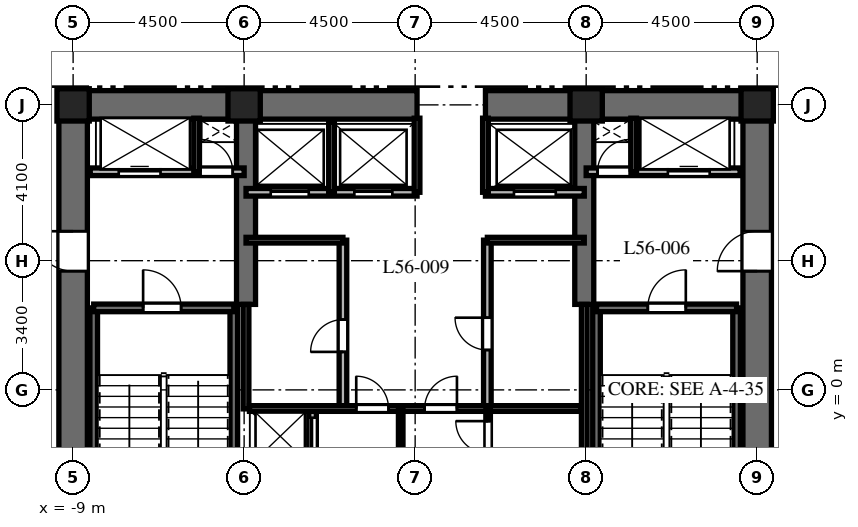
"""IFC4 building model, lengths in metres.
Left out: names, types, materials, properties, quantities, classifications, styles, units other than length and angle.
Written with IfcOpenShell. Run it as: python <this file> out.ifc"""

import sys

from ifc_helpers import new_model, si_unit, direction, frame, frame_2d, origin, origin_2d, place, context, subcontext, project, spatial, rectangle, extrude, element, fill, save


model = new_model("IFC4")
c1 = context("Model", 3, precision=1e-05, world=origin(), true_north=direction((0.0, 1.0)))
c2 = subcontext(c1, "Body", "Model", "MODEL_VIEW")
j1 = project(units=[si_unit("LENGTHUNIT", "METRE"), si_unit("PLANEANGLEUNIT", "RADIAN")], contexts=[c1])
p1 = place(None, origin())
s1 = spatial("IfcSite", under=j1, at=p1, CompositionType="ELEMENT")
p2 = place(p1, origin())
s2 = spatial("IfcBuilding", under=s1, at=p2, CompositionType="ELEMENT")
p3 = place(p2, frame((0.0, 0.0, 225.5)))
s3 = spatial("IfcBuildingStorey", under=s2, at=p3, CompositionType="ELEMENT", Elevation=225.5)
p4 = place(p3, frame((-9.375, 7.5, 0.0), z_axis=(0.0, 0.0, 1.0), x_axis=(1.0, 0.0, 0.0)))
e1 = element("IfcWall", 1, at=p4, inside=s3, PredefinedType="SHEAR", context=c2, shape_type="SweptSolid", body=[
    extrude(rectangle(XDim=9.425, YDim=0.75, at=frame_2d((4.712, 0.0))), origin(), (0.0, 0.0, 1.0), 3.8),
])
p5 = place(p3, frame((1.85, 7.5, 0.0), z_axis=(0.0, 0.0, 1.0), x_axis=(1.0, 0.0, 0.0)))
e2 = element("IfcWall", 2, at=p5, inside=s3, PredefinedType="SHEAR", context=c2, shape_type="SweptSolid", body=[
    extrude(rectangle(XDim=7.525, YDim=0.75, at=frame_2d((3.762, 0.0))), origin(), (0.0, 0.0, 1.0), 3.8),
])
p6 = place(p3, frame((-9.0, -7.125, 0.0), z_axis=(0.0, 0.0, 1.0), x_axis=(0.0, 1.0, 0.0)))
e3 = element("IfcWall", 3, at=p6, inside=s3, PredefinedType="SHEAR", context=c2, shape_type="SweptSolid", body=[
    extrude(rectangle(XDim=14.25, YDim=0.75, at=frame_2d((7.125, 0.0))), origin(), (0.0, 0.0, 1.0), 3.8),
])
p7 = place(p6, frame((10.25, 0.0, 0.0)))
e4 = element("IfcOpeningElement", 4, at=p7, cuts=e3, PredefinedType="OPENING", context=c2, shape_type="SweptSolid", body=[
    extrude(rectangle(XDim=1.05, YDim=2.15, at=frame_2d((0.525, 1.075))), frame((0.0, 0.385, 0.0), z_axis=(0.0, -1.0, 0.0), x_axis=(1.0, 0.0, 0.0)), (0.0, 0.0, 1.0), 0.77),
])
p8 = place(p3, frame((9.0, -7.125, 0.0), z_axis=(0.0, 0.0, 1.0), x_axis=(0.0, 1.0, 0.0)))
e5 = element("IfcWall", 5, at=p8, inside=s3, PredefinedType="SHEAR", context=c2, shape_type="SweptSolid", body=[
    extrude(rectangle(XDim=14.25, YDim=0.75, at=frame_2d((7.125, 0.0))), origin(), (0.0, 0.0, 1.0), 3.8),
])
p9 = place(p8, frame((10.25, 0.0, 0.0)))
e6 = element("IfcOpeningElement", 6, at=p9, cuts=e5, PredefinedType="OPENING", context=c2, shape_type="SweptSolid", body=[
    extrude(rectangle(XDim=1.05, YDim=2.15, at=frame_2d((0.525, 1.075))), frame((0.0, 0.385, 0.0), z_axis=(0.0, -1.0, 0.0), x_axis=(1.0, 0.0, 0.0)), (0.0, 0.0, 1.0), 0.77),
])
for number, where, z_axis, x_axis in (
    (7, (-4.45, 2.25, 0.0), (0.0, 0.0, 1.0), (0.0, 1.0, 0.0)),
    (8, (4.45, 2.25, 0.0), (0.0, 0.0, 1.0), (0.0, 1.0, 0.0)),
):
    element("IfcWall", number, at=place(p3, frame(where, z_axis=z_axis, x_axis=x_axis)), inside=s3, PredefinedType="SHEAR", context=c2, shape_type="SweptSolid", body=[
        extrude(rectangle(XDim=4.875, YDim=0.5, at=frame_2d((2.438, 0.0))), origin(), (0.0, 0.0, 1.0), 3.8),
    ])
for number, where, z_axis, x_axis in (
    (9, (-8.458, -6.985, 0.0), (0.0, 0.0, 1.0), (0.0, 1.0, 0.0)),
    (10, (-4.772, -6.985, 0.0), (0.0, 0.0, 1.0), (0.0, 1.0, 0.0)),
):
    element("IfcWall", number, at=place(p3, frame(where, z_axis=z_axis, x_axis=x_axis)), inside=s3, PredefinedType="SHEAR", context=c2, shape_type="SweptSolid", body=[
        extrude(rectangle(XDim=9.143, YDim=0.2, at=frame_2d((4.572, 0.0))), origin(), (0.0, 0.0, 1.0), 3.8),
    ])
p10 = place(p3, frame((-8.458, 2.158, 0.0), z_axis=(0.0, 0.0, 1.0), x_axis=(1.0, 0.0, 0.0)))
e11 = element("IfcWall", 11, at=p10, inside=s3, PredefinedType="SHEAR", context=c2, shape_type="SweptSolid", body=[
    extrude(rectangle(XDim=3.686, YDim=0.2, at=frame_2d((1.843, 0.0))), origin(), (0.0, 0.0, 1.0), 3.8),
])
p11 = place(p10, frame((1.3, 0.0, 0.0)))
e12 = element("IfcOpeningElement", 12, at=p11, cuts=e11, PredefinedType="OPENING", context=c2, shape_type="SweptSolid", body=[
    extrude(rectangle(XDim=1.0, YDim=2.15, at=frame_2d((0.5, 1.075))), frame((0.0, 0.11, 0.0), z_axis=(0.0, -1.0, 0.0), x_axis=(1.0, 0.0, 0.0)), (0.0, 0.0, 1.0), 0.22),
])
for number, where, z_axis, x_axis in (
    (13, (4.772, -6.985, 0.0), (0.0, 0.0, 1.0), (0.0, 1.0, 0.0)),
    (14, (8.458, -6.985, 0.0), (0.0, 0.0, 1.0), (0.0, 1.0, 0.0)),
):
    element("IfcWall", number, at=place(p3, frame(where, z_axis=z_axis, x_axis=x_axis)), inside=s3, PredefinedType="SHEAR", context=c2, shape_type="SweptSolid", body=[
        extrude(rectangle(XDim=9.143, YDim=0.2, at=frame_2d((4.572, 0.0))), origin(), (0.0, 0.0, 1.0), 3.8),
    ])
p12 = place(p3, frame((4.772, 2.158, 0.0), z_axis=(0.0, 0.0, 1.0), x_axis=(1.0, 0.0, 0.0)))
e15 = element("IfcWall", 15, at=p12, inside=s3, PredefinedType="SHEAR", context=c2, shape_type="SweptSolid", body=[
    extrude(rectangle(XDim=3.686, YDim=0.2, at=frame_2d((1.843, 0.0))), origin(), (0.0, 0.0, 1.0), 3.8),
])
p13 = place(p12, frame((1.35, 0.0, 0.0)))
e16 = element("IfcOpeningElement", 16, at=p13, cuts=e15, PredefinedType="OPENING", context=c2, shape_type="SweptSolid", body=[
    extrude(rectangle(XDim=1.0, YDim=2.15, at=frame_2d((0.5, 1.075))), frame((0.0, 0.11, 0.0), z_axis=(0.0, -1.0, 0.0), x_axis=(1.0, 0.0, 0.0)), (0.0, 0.0, 1.0), 0.22),
])
for number, where, z_axis, x_axis in (
    (17, (9.0, 7.5, 0.0), (0.0, 0.0, 1.0), (1.0, 0.0, 0.0)),
    (18, (4.5, 7.5, 0.0), (0.0, 0.0, 1.0), (1.0, 0.0, 0.0)),
    (19, (-4.5, 7.5, 0.0), (0.0, 0.0, 1.0), (1.0, 0.0, 0.0)),
    (20, (-9.0, 7.5, 0.0), (0.0, 0.0, 1.0), (1.0, 0.0, 0.0)),
):
    element("IfcColumn", number, at=place(p3, frame(where, z_axis=z_axis, x_axis=x_axis)), inside=s3, PredefinedType="COLUMN", context=c2, shape_type="SweptSolid", body=[
        extrude(rectangle(XDim=0.85, YDim=0.85, at=origin_2d()), origin(), (0.0, 0.0, 1.0), 3.8),
    ])
p14 = place(p3, frame((-8.55, 5.74, 0.0), z_axis=(0.0, 0.0, 1.0), x_axis=(1.0, 0.0, 0.0)))
e21 = element("IfcWall", 21, at=p14, inside=s3, PredefinedType="PARTITIONING", context=c2, shape_type="SweptSolid", body=[
    extrude(rectangle(XDim=4.05, YDim=0.2, at=frame_2d((2.025, 0.0))), origin(), (0.0, 0.0, 1.0), 3.5),
])
p15 = place(p14, frame((0.75, 0.0, 0.0)))
e22 = element("IfcOpeningElement", 22, at=p15, cuts=e21, PredefinedType="OPENING", context=c2, shape_type="SweptSolid", body=[
    extrude(rectangle(XDim=1.1, YDim=2.2, at=frame_2d((0.55, 1.1))), frame((0.0, 0.11, 0.0), z_axis=(0.0, -1.0, 0.0), x_axis=(1.0, 0.0, 0.0)), (0.0, 0.0, 1.0), 0.22),
])
p16 = place(p14, frame((2.9, 0.0, 0.0)))
e23 = element("IfcOpeningElement", 23, at=p16, cuts=e21, PredefinedType="OPENING", context=c2, shape_type="SweptSolid", body=[
    extrude(rectangle(XDim=0.85, YDim=2.03, at=frame_2d((0.425, 1.015))), frame((0.0, 0.11, 0.0), z_axis=(0.0, -1.0, 0.0), x_axis=(1.0, 0.0, 0.0)), (0.0, 0.0, 1.0), 0.22),
])
p17 = place(p3, frame((-5.75, 5.74, 0.0), z_axis=(0.0, 0.0, 1.0), x_axis=(0.0, 1.0, 0.0)))
e24 = element("IfcWall", 24, at=p17, inside=s3, PredefinedType="PARTITIONING", context=c2, shape_type="SweptSolid", body=[
    extrude(rectangle(XDim=1.41, YDim=0.15, at=frame_2d((0.705, 0.0))), origin(), (0.0, 0.0, 1.0), 3.5),
])
p18 = place(p3, frame((4.5, 5.74, 0.0), z_axis=(0.0, 0.0, 1.0), x_axis=(1.0, 0.0, 0.0)))
e25 = element("IfcWall", 25, at=p18, inside=s3, PredefinedType="PARTITIONING", context=c2, shape_type="SweptSolid", body=[
    extrude(rectangle(XDim=4.05, YDim=0.2, at=frame_2d((2.025, 0.0))), origin(), (0.0, 0.0, 1.0), 3.5),
])
p19 = place(p18, frame((0.3, 0.0, 0.0)))
e26 = element("IfcOpeningElement", 26, at=p19, cuts=e25, PredefinedType="OPENING", context=c2, shape_type="SweptSolid", body=[
    extrude(rectangle(XDim=0.85, YDim=2.03, at=frame_2d((0.425, 1.015))), frame((0.0, 0.11, 0.0), z_axis=(0.0, -1.0, 0.0), x_axis=(1.0, 0.0, 0.0)), (0.0, 0.0, 1.0), 0.22),
])
p20 = place(p18, frame((2.15, 0.0, 0.0)))
e27 = element("IfcOpeningElement", 27, at=p20, cuts=e25, PredefinedType="OPENING", context=c2, shape_type="SweptSolid", body=[
    extrude(rectangle(XDim=1.1, YDim=2.2, at=frame_2d((0.55, 1.1))), frame((0.0, 0.11, 0.0), z_axis=(0.0, -1.0, 0.0), x_axis=(1.0, 0.0, 0.0)), (0.0, 0.0, 1.0), 0.22),
])
p21 = place(p3, frame((5.75, 5.74, 0.0), z_axis=(0.0, 0.0, 1.0), x_axis=(0.0, 1.0, 0.0)))
e28 = element("IfcWall", 28, at=p21, inside=s3, PredefinedType="PARTITIONING", context=c2, shape_type="SweptSolid", body=[
    extrude(rectangle(XDim=1.41, YDim=0.15, at=frame_2d((0.705, 0.0))), origin(), (0.0, 0.0, 1.0), 3.5),
])
p22 = place(p3, frame((-2.7, -1.972, 0.0), z_axis=(0.0, 0.0, 1.0), x_axis=(0.0, 1.0, 0.0)))
e29 = element("IfcWall", 29, at=p22, inside=s3, PredefinedType="PARTITIONING", context=c2, shape_type="SweptSolid", body=[
    extrude(rectangle(XDim=1.472, YDim=0.2, at=frame_2d((0.736, 0.0))), origin(), (0.0, 0.0, 1.0), 3.5),
])
p23 = place(p22, frame((0.24, 0.0, 0.0)))
e30 = element("IfcOpeningElement", 30, at=p23, cuts=e29, PredefinedType="OPENING", context=c2, shape_type="SweptSolid", body=[
    extrude(rectangle(XDim=1.0, YDim=2.2, at=frame_2d((0.5, 1.1))), frame((0.0, 0.11, 0.0), z_axis=(0.0, -1.0, 0.0), x_axis=(1.0, 0.0, 0.0)), (0.0, 0.0, 1.0), 0.22),
])
p24 = place(p3, frame((-4.45, 5.2, 0.0), z_axis=(0.0, 0.0, 1.0), x_axis=(1.0, 0.0, 0.0)))
e31 = element("IfcWall", 31, at=p24, inside=s3, PredefinedType="PARTITIONING", context=c2, shape_type="SweptSolid", body=[
    extrude(rectangle(XDim=4.5, YDim=0.2, at=frame_2d((2.25, 0.0))), origin(), (0.0, 0.0, 1.0), 3.5),
])
p25 = place(p24, frame((0.65, 0.0, 0.0)))
e32 = element("IfcOpeningElement", 32, at=p25, cuts=e31, PredefinedType="OPENING", context=c2, shape_type="SweptSolid", body=[
    extrude(rectangle(XDim=1.0, YDim=2.2, at=frame_2d((0.5, 1.1))), frame((0.0, 0.11, 0.0), z_axis=(0.0, -1.0, 0.0), x_axis=(1.0, 0.0, 0.0)), (0.0, 0.0, 1.0), 0.22),
])
p26 = place(p24, frame((2.85, 0.0, 0.0)))
e33 = element("IfcOpeningElement", 33, at=p26, cuts=e31, PredefinedType="OPENING", context=c2, shape_type="SweptSolid", body=[
    extrude(rectangle(XDim=1.0, YDim=2.2, at=frame_2d((0.5, 1.1))), frame((0.0, 0.11, 0.0), z_axis=(0.0, -1.0, 0.0), x_axis=(1.0, 0.0, 0.0)), (0.0, 0.0, 1.0), 0.22),
])
p27 = place(p3, frame((1.85, 5.2, 0.0), z_axis=(0.0, 0.0, 1.0), x_axis=(1.0, 0.0, 0.0)))
e34 = element("IfcWall", 34, at=p27, inside=s3, PredefinedType="PARTITIONING", context=c2, shape_type="SweptSolid", body=[
    extrude(rectangle(XDim=2.6, YDim=0.2, at=frame_2d((1.3, 0.0))), origin(), (0.0, 0.0, 1.0), 3.5),
])
p28 = place(p27, frame((0.75, 0.0, 0.0)))
e35 = element("IfcOpeningElement", 35, at=p28, cuts=e34, PredefinedType="OPENING", context=c2, shape_type="SweptSolid", body=[
    extrude(rectangle(XDim=1.1, YDim=2.2, at=frame_2d((0.55, 1.1))), frame((0.0, 0.11, 0.0), z_axis=(0.0, -1.0, 0.0), x_axis=(1.0, 0.0, 0.0)), (0.0, 0.0, 1.0), 0.22),
])
p29 = place(p3, frame((-2.2, 5.2, 0.0), z_axis=(0.0, 0.0, 1.0), x_axis=(0.0, 1.0, 0.0)))
e36 = element("IfcWall", 36, at=p29, inside=s3, PredefinedType="PARTITIONING", context=c2, shape_type="SweptSolid", body=[
    extrude(rectangle(XDim=1.85, YDim=0.15, at=frame_2d((0.925, 0.0))), origin(), (0.0, 0.0, 1.0), 3.5),
])
for number, where, z_axis, x_axis in (
    (37, (0.05, 5.2, 0.0), (0.0, 0.0, 1.0), (0.0, 1.0, 0.0)),
    (38, (1.85, 5.2, 0.0), (0.0, 0.0, 1.0), (0.0, 1.0, 0.0)),
):
    element("IfcWall", number, at=place(p3, frame(where, z_axis=z_axis, x_axis=x_axis)), inside=s3, PredefinedType="PARTITIONING", context=c2, shape_type="SweptSolid", body=[
        extrude(rectangle(XDim=1.95, YDim=0.15, at=frame_2d((0.975, 0.0))), origin(), (0.0, 0.0, 1.0), 3.5),
    ])
p30 = place(p3, frame((-4.45, -0.5, 0.0), z_axis=(0.0, 0.0, 1.0), x_axis=(0.0, 1.0, 0.0)))
e39 = element("IfcWall", 39, at=p30, inside=s3, PredefinedType="PARTITIONING", context=c2, shape_type="SweptSolid", body=[
    extrude(rectangle(XDim=2.75, YDim=0.15, at=frame_2d((1.375, 0.0))), origin(), (0.0, 0.0, 1.0), 3.5),
])
p31 = place(p3, frame((4.45, -1.972, 0.0), z_axis=(0.0, 0.0, 1.0), x_axis=(0.0, 1.0, 0.0)))
e40 = element("IfcWall", 40, at=p31, inside=s3, PredefinedType="PARTITIONING", context=c2, shape_type="SweptSolid", body=[
    extrude(rectangle(XDim=4.222, YDim=0.15, at=frame_2d((2.111, 0.0))), origin(), (0.0, 0.0, 1.0), 3.5),
])
p32 = place(p3, frame((-1.9, -0.5, 0.0), z_axis=(0.0, 0.0, 1.0), x_axis=(0.0, 1.0, 0.0)))
e41 = element("IfcWall", 41, at=p32, inside=s3, PredefinedType="PARTITIONING", context=c2, shape_type="SweptSolid", body=[
    extrude(rectangle(XDim=4.44, YDim=0.2, at=frame_2d((2.22, 0.0))), origin(), (0.0, 0.0, 1.0), 3.5),
])
p33 = place(p32, frame((1.5, 0.0, 0.0)))
e42 = element("IfcOpeningElement", 42, at=p33, cuts=e41, PredefinedType="OPENING", context=c2, shape_type="SweptSolid", body=[
    extrude(rectangle(XDim=0.85, YDim=2.03, at=frame_2d((0.425, 1.015))), frame((0.0, 0.11, 0.0), z_axis=(0.0, -1.0, 0.0), x_axis=(1.0, 0.0, 0.0)), (0.0, 0.0, 1.0), 0.22),
])
p34 = place(p3, frame((-4.45, 3.94, 0.0), z_axis=(0.0, 0.0, 1.0), x_axis=(1.0, 0.0, 0.0)))
e43 = element("IfcWall", 43, at=p34, inside=s3, PredefinedType="PARTITIONING", context=c2, shape_type="SweptSolid", body=[
    extrude(rectangle(XDim=2.55, YDim=0.15, at=frame_2d((1.275, 0.0))), origin(), (0.0, 0.0, 1.0), 3.5),
])
p35 = place(p3, frame((1.9, -0.5, 0.0), z_axis=(0.0, 0.0, 1.0), x_axis=(0.0, 1.0, 0.0)))
e44 = element("IfcWall", 44, at=p35, inside=s3, PredefinedType="PARTITIONING", context=c2, shape_type="SweptSolid", body=[
    extrude(rectangle(XDim=4.44, YDim=0.2, at=frame_2d((2.22, 0.0))), origin(), (0.0, 0.0, 1.0), 3.5),
])
p36 = place(p35, frame((1.55, 0.0, 0.0)))
e45 = element("IfcOpeningElement", 45, at=p36, cuts=e44, PredefinedType="OPENING", context=c2, shape_type="SweptSolid", body=[
    extrude(rectangle(XDim=0.85, YDim=2.03, at=frame_2d((0.425, 1.015))), frame((0.0, 0.11, 0.0), z_axis=(0.0, -1.0, 0.0), x_axis=(1.0, 0.0, 0.0)), (0.0, 0.0, 1.0), 0.22),
])
p37 = place(p3, frame((1.9, 3.94, 0.0), z_axis=(0.0, 0.0, 1.0), x_axis=(1.0, 0.0, 0.0)))
e46 = element("IfcWall", 46, at=p37, inside=s3, PredefinedType="PARTITIONING", context=c2, shape_type="SweptSolid", body=[
    extrude(rectangle(XDim=2.55, YDim=0.15, at=frame_2d((1.275, 0.0))), origin(), (0.0, 0.0, 1.0), 3.5),
])
p38 = place(p3, frame((-4.36, -0.49, 0.0), z_axis=(0.0, 0.0, 1.0), x_axis=(1.0, 0.0, 0.0)))
e47 = element("IfcWall", 47, at=p38, inside=s3, PredefinedType="PARTITIONING", context=c2, shape_type="SweptSolid", body=[
    extrude(rectangle(XDim=8.72, YDim=0.15, at=frame_2d((4.36, 0.0))), origin(), (0.0, 0.0, 1.0), 3.5),
])
p39 = place(p38, frame((2.81, 0.0, 0.0)))
e48 = element("IfcOpeningElement", 48, at=p39, cuts=e47, PredefinedType="OPENING", context=c2, shape_type="SweptSolid", body=[
    extrude(rectangle(XDim=0.85, YDim=2.03, at=frame_2d((0.425, 1.015))), frame((0.0, 0.085, 0.0), z_axis=(0.0, -1.0, 0.0), x_axis=(1.0, 0.0, 0.0)), (0.0, 0.0, 1.0), 0.17),
])
p40 = place(p38, frame((4.61, 0.0, 0.0)))
e49 = element("IfcOpeningElement", 49, at=p40, cuts=e47, PredefinedType="OPENING", context=c2, shape_type="SweptSolid", body=[
    extrude(rectangle(XDim=0.85, YDim=2.03, at=frame_2d((0.425, 1.015))), frame((0.0, 0.085, 0.0), z_axis=(0.0, -1.0, 0.0), x_axis=(1.0, 0.0, 0.0)), (0.0, 0.0, 1.0), 0.17),
])
p41 = place(p3, frame((-0.38, -1.972, 0.0), z_axis=(0.0, 0.0, 1.0), x_axis=(0.0, 1.0, 0.0)))
e50 = element("IfcWall", 50, at=p41, inside=s3, PredefinedType="PARTITIONING", context=c2, shape_type="SweptSolid", body=[
    extrude(rectangle(XDim=1.472, YDim=0.12, at=frame_2d((0.736, 0.0))), origin(), (0.0, 0.0, 1.0), 3.5),
])
p42 = place(p3, frame((1.92, -1.972, 0.0), z_axis=(0.0, 0.0, 1.0), x_axis=(0.0, 1.0, 0.0)))
e51 = element("IfcWall", 51, at=p42, inside=s3, PredefinedType="PARTITIONING", context=c2, shape_type="SweptSolid", body=[
    extrude(rectangle(XDim=1.472, YDim=0.12, at=frame_2d((0.736, 0.0))), origin(), (0.0, 0.0, 1.0), 3.5),
])
p43 = place(p42, frame((0.3, 0.0, 0.0)))
e52 = element("IfcOpeningElement", 52, at=p43, cuts=e51, PredefinedType="OPENING", context=c2, shape_type="SweptSolid", body=[
    extrude(rectangle(XDim=0.85, YDim=2.03, at=frame_2d((0.425, 1.015))), frame((0.0, 0.07, 0.0), z_axis=(0.0, -1.0, 0.0), x_axis=(1.0, 0.0, 0.0)), (0.0, 0.0, 1.0), 0.14),
])
p44 = place(p11, origin())
e53 = element("IfcDoor", 53, at=p44, inside=s3, OperationType="SINGLE_SWING_LEFT", PredefinedType="DOOR", context=c2, shape_type="SweptSolid", body=[
    extrude(rectangle(XDim=1.0, YDim=2.15, at=frame_2d((0.5, 1.075))), frame((0.0, 0.025, 0.0), z_axis=(0.0, -1.0, 0.0), x_axis=(1.0, 0.0, 0.0)), (0.0, 0.0, 1.0), 0.05),
])
fill(e12, e53)
p45 = place(p13, origin())
e54 = element("IfcDoor", 54, at=p45, inside=s3, OperationType="SINGLE_SWING_RIGHT", PredefinedType="DOOR", context=c2, shape_type="SweptSolid", body=[
    extrude(rectangle(XDim=1.0, YDim=2.15, at=frame_2d((0.5, 1.075))), frame((0.0, 0.025, 0.0), z_axis=(0.0, -1.0, 0.0), x_axis=(1.0, 0.0, 0.0)), (0.0, 0.0, 1.0), 0.05),
])
fill(e16, e54)
p46 = place(p7, origin())
e55 = element("IfcDoor", 55, at=p46, inside=s3, OperationType="SINGLE_SWING_RIGHT", PredefinedType="DOOR", context=c2, shape_type="SweptSolid", body=[
    extrude(rectangle(XDim=1.05, YDim=2.15, at=frame_2d((0.525, 1.075))), frame((0.0, 0.025, 0.0), z_axis=(0.0, -1.0, 0.0), x_axis=(1.0, 0.0, 0.0)), (0.0, 0.0, 1.0), 0.05),
])
fill(e4, e55)
p47 = place(p9, origin())
e56 = element("IfcDoor", 56, at=p47, inside=s3, OperationType="SINGLE_SWING_LEFT", PredefinedType="DOOR", context=c2, shape_type="SweptSolid", body=[
    extrude(rectangle(XDim=1.05, YDim=2.15, at=frame_2d((0.525, 1.075))), frame((0.0, 0.025, 0.0), z_axis=(0.0, -1.0, 0.0), x_axis=(1.0, 0.0, 0.0)), (0.0, 0.0, 1.0), 0.05),
])
fill(e6, e56)
p48 = place(p15, origin())
e57 = element("IfcDoor", 57, at=p48, inside=s3, OperationType="SLIDING_TO_LEFT", PredefinedType="DOOR", context=c2, shape_type="SweptSolid", body=[
    extrude(rectangle(XDim=1.1, YDim=2.2, at=frame_2d((0.55, 1.1))), frame((0.0, 0.025, 0.0), z_axis=(0.0, -1.0, 0.0), x_axis=(1.0, 0.0, 0.0)), (0.0, 0.0, 1.0), 0.05),
])
fill(e22, e57)
p49 = place(p16, origin())
e58 = element("IfcDoor", 58, at=p49, inside=s3, OperationType="SINGLE_SWING_LEFT", PredefinedType="DOOR", context=c2, shape_type="SweptSolid", body=[
    extrude(rectangle(XDim=0.85, YDim=2.03, at=frame_2d((0.425, 1.015))), frame((0.0, 0.025, 0.0), z_axis=(0.0, -1.0, 0.0), x_axis=(1.0, 0.0, 0.0)), (0.0, 0.0, 1.0), 0.05),
])
fill(e23, e58)
p50 = place(p19, origin())
e59 = element("IfcDoor", 59, at=p50, inside=s3, OperationType="SINGLE_SWING_RIGHT", PredefinedType="DOOR", context=c2, shape_type="SweptSolid", body=[
    extrude(rectangle(XDim=0.85, YDim=2.03, at=frame_2d((0.425, 1.015))), frame((0.0, 0.025, 0.0), z_axis=(0.0, -1.0, 0.0), x_axis=(1.0, 0.0, 0.0)), (0.0, 0.0, 1.0), 0.05),
])
fill(e26, e59)
p51 = place(p20, origin())
e60 = element("IfcDoor", 60, at=p51, inside=s3, OperationType="SLIDING_TO_RIGHT", PredefinedType="DOOR", context=c2, shape_type="SweptSolid", body=[
    extrude(rectangle(XDim=1.1, YDim=2.2, at=frame_2d((0.55, 1.1))), frame((0.0, 0.025, 0.0), z_axis=(0.0, -1.0, 0.0), x_axis=(1.0, 0.0, 0.0)), (0.0, 0.0, 1.0), 0.05),
])
fill(e27, e60)
p52 = place(p23, origin())
e61 = element("IfcDoor", 61, at=p52, inside=s3, OperationType="SLIDING_TO_LEFT", PredefinedType="DOOR", context=c2, shape_type="SweptSolid", body=[
    extrude(rectangle(XDim=1.0, YDim=2.2, at=frame_2d((0.5, 1.1))), frame((0.0, 0.025, 0.0), z_axis=(0.0, -1.0, 0.0), x_axis=(1.0, 0.0, 0.0)), (0.0, 0.0, 1.0), 0.05),
])
fill(e30, e61)
p53 = place(p25, origin())
e62 = element("IfcDoor", 62, at=p53, inside=s3, OperationType="SLIDING_TO_LEFT", PredefinedType="DOOR", context=c2, shape_type="SweptSolid", body=[
    extrude(rectangle(XDim=1.0, YDim=2.2, at=frame_2d((0.5, 1.1))), frame((0.0, 0.025, 0.0), z_axis=(0.0, -1.0, 0.0), x_axis=(1.0, 0.0, 0.0)), (0.0, 0.0, 1.0), 0.05),
])
fill(e32, e62)
p54 = place(p26, origin())
e63 = element("IfcDoor", 63, at=p54, inside=s3, OperationType="SLIDING_TO_RIGHT", PredefinedType="DOOR", context=c2, shape_type="SweptSolid", body=[
    extrude(rectangle(XDim=1.0, YDim=2.2, at=frame_2d((0.5, 1.1))), frame((0.0, 0.025, 0.0), z_axis=(0.0, -1.0, 0.0), x_axis=(1.0, 0.0, 0.0)), (0.0, 0.0, 1.0), 0.05),
])
fill(e33, e63)
p55 = place(p28, origin())
e64 = element("IfcDoor", 64, at=p55, inside=s3, OperationType="SLIDING_TO_RIGHT", PredefinedType="DOOR", context=c2, shape_type="SweptSolid", body=[
    extrude(rectangle(XDim=1.1, YDim=2.2, at=frame_2d((0.55, 1.1))), frame((0.0, 0.025, 0.0), z_axis=(0.0, -1.0, 0.0), x_axis=(1.0, 0.0, 0.0)), (0.0, 0.0, 1.0), 0.05),
])
fill(e35, e64)
p56 = place(p33, origin())
e65 = element("IfcDoor", 65, at=p56, inside=s3, OperationType="SINGLE_SWING_LEFT", PredefinedType="DOOR", context=c2, shape_type="SweptSolid", body=[
    extrude(rectangle(XDim=0.85, YDim=2.03, at=frame_2d((0.425, 1.015))), frame((0.0, 0.025, 0.0), z_axis=(0.0, -1.0, 0.0), x_axis=(1.0, 0.0, 0.0)), (0.0, 0.0, 1.0), 0.05),
])
fill(e42, e65)
p57 = place(p36, origin())
e66 = element("IfcDoor", 66, at=p57, inside=s3, OperationType="SINGLE_SWING_RIGHT", PredefinedType="DOOR", context=c2, shape_type="SweptSolid", body=[
    extrude(rectangle(XDim=0.85, YDim=2.03, at=frame_2d((0.425, 1.015))), frame((0.0, 0.025, 0.0), z_axis=(0.0, -1.0, 0.0), x_axis=(1.0, 0.0, 0.0)), (0.0, 0.0, 1.0), 0.05),
])
fill(e45, e66)
p58 = place(p39, origin())
e67 = element("IfcDoor", 67, at=p58, inside=s3, OperationType="SINGLE_SWING_LEFT", PredefinedType="DOOR", context=c2, shape_type="SweptSolid", body=[
    extrude(rectangle(XDim=0.85, YDim=2.03, at=frame_2d((0.425, 1.015))), frame((0.0, 0.025, 0.0), z_axis=(0.0, -1.0, 0.0), x_axis=(1.0, 0.0, 0.0)), (0.0, 0.0, 1.0), 0.05),
])
fill(e48, e67)
p59 = place(p40, origin())
e68 = element("IfcDoor", 68, at=p59, inside=s3, OperationType="SINGLE_SWING_RIGHT", PredefinedType="DOOR", context=c2, shape_type="SweptSolid", body=[
    extrude(rectangle(XDim=0.85, YDim=2.03, at=frame_2d((0.425, 1.015))), frame((0.0, 0.025, 0.0), z_axis=(0.0, -1.0, 0.0), x_axis=(1.0, 0.0, 0.0)), (0.0, 0.0, 1.0), 0.05),
])
fill(e49, e68)
p60 = place(p43, origin())
e69 = element("IfcDoor", 69, at=p60, inside=s3, OperationType="SINGLE_SWING_RIGHT", PredefinedType="DOOR", context=c2, shape_type="SweptSolid", body=[
    extrude(rectangle(XDim=0.85, YDim=2.03, at=frame_2d((0.425, 1.015))), frame((0.0, 0.025, 0.0), z_axis=(0.0, -1.0, 0.0), x_axis=(1.0, 0.0, 0.0)), (0.0, 0.0, 1.0), 0.05),
])
fill(e52, e69)
save(model, sys.argv[1])
